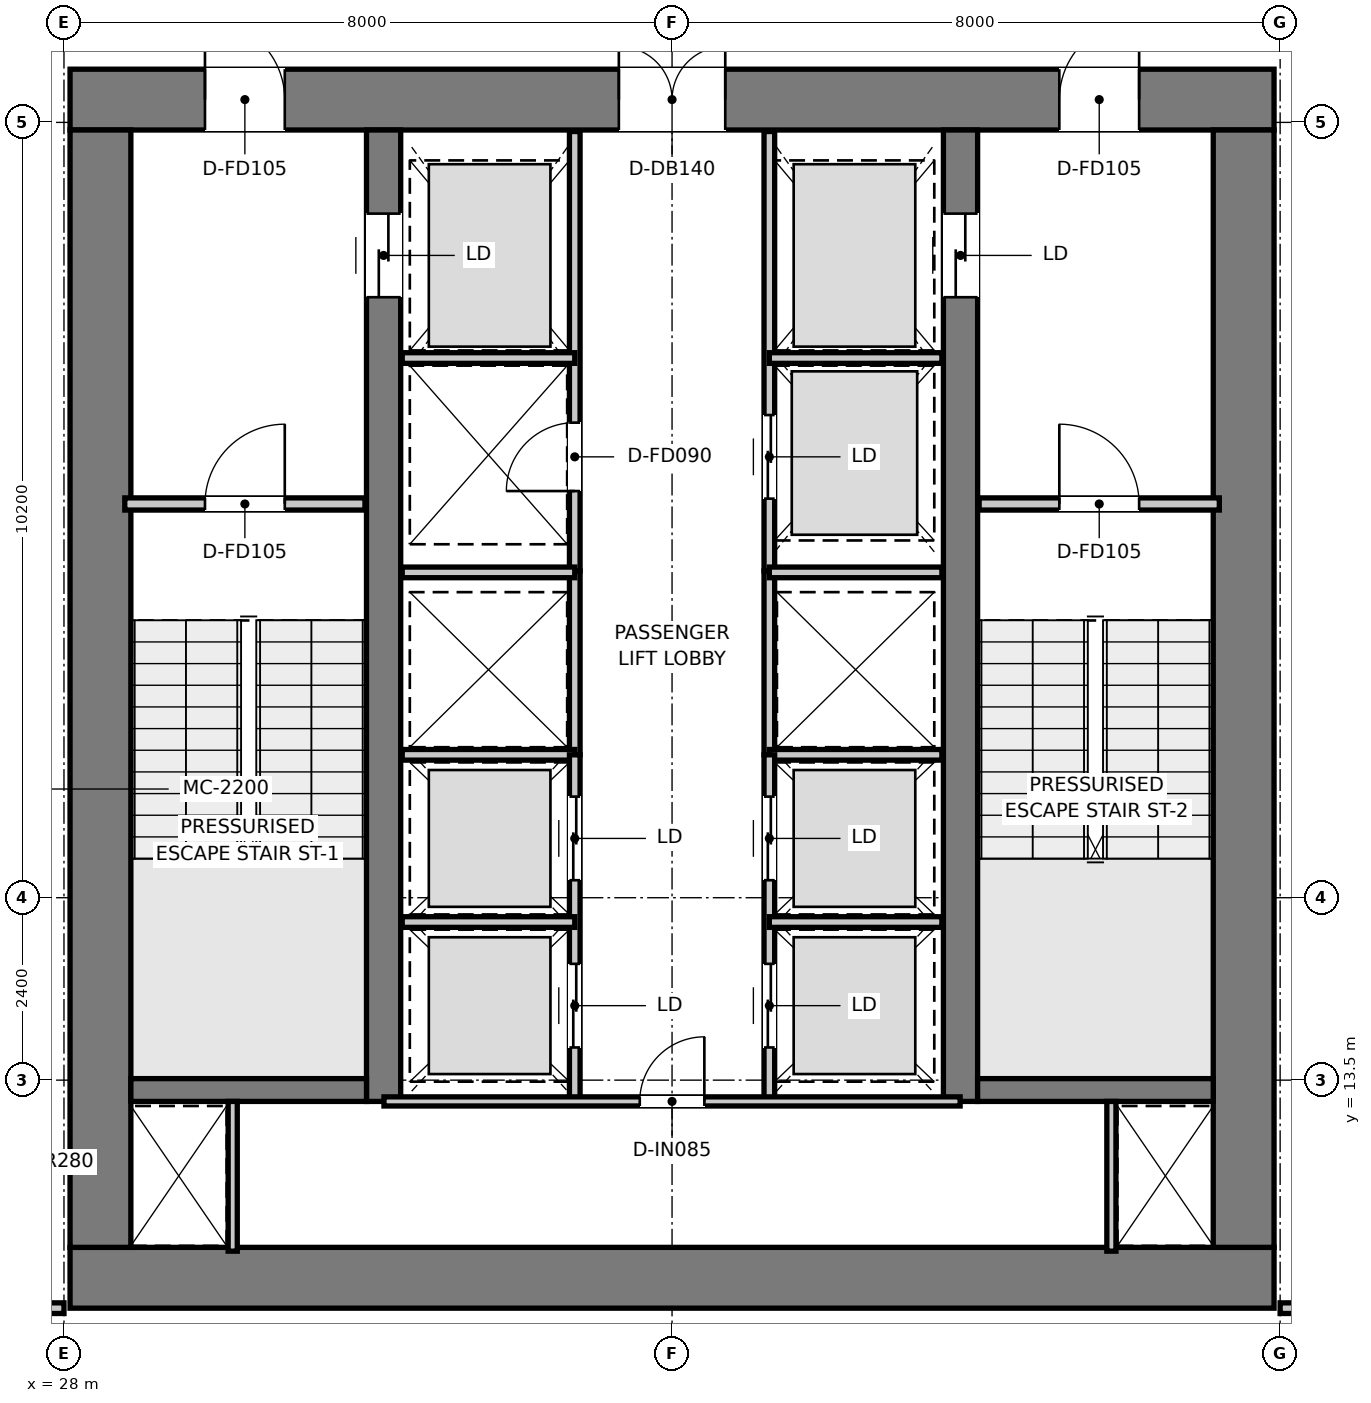
"""IFC4 building model, lengths in metres.
Left out: names, types, materials, properties, quantities, classifications, styles, units other than length and angle.
Written with IfcOpenShell. Run it as: python <this file> out.ifc"""

import sys

from ifc_helpers import new_model, si_unit, direction, frame, frame_2d, origin, place, context, subcontext, project, spatial, rectangle, extrude, element, fill, save


model = new_model("IFC4")
c1 = context("Model", 3, precision=1e-05, world=origin(), true_north=direction((0.0, 1.0)))
c2 = subcontext(c1, "Body", "Model", "MODEL_VIEW")
j1 = project(units=[si_unit("LENGTHUNIT", "METRE"), si_unit("PLANEANGLEUNIT", "RADIAN")], contexts=[c1])
p1 = place(None, origin())
s1 = spatial("IfcSite", under=j1, at=p1, CompositionType="ELEMENT")
p2 = place(p1, origin())
s2 = spatial("IfcBuilding", under=s1, at=p2, CompositionType="ELEMENT")
p3 = place(p2, frame((0.0, 0.0, 48.7)))
s3 = spatial("IfcBuildingStorey", under=s2, at=p3, CompositionType="ELEMENT", Elevation=48.7)
p4 = place(p3, frame((28.08, 10.9, 0.0), z_axis=(0.0, 0.0, 1.0), x_axis=(1.0, 0.0, 0.0)))
e1 = element("IfcWall", 1, at=p4, inside=s3, PredefinedType="SHEAR", context=c2, shape_type="SweptSolid", body=[
    extrude(rectangle(XDim=15.84, YDim=0.8, at=frame_2d((7.92, 0.0))), origin(), (0.0, 0.0, 1.0), 3.95),
])
p5 = place(p3, frame((28.08, 26.4, 0.0), z_axis=(0.0, 0.0, 1.0), x_axis=(1.0, 0.0, 0.0)))
e2 = element("IfcWall", 2, at=p5, inside=s3, PredefinedType="SHEAR", context=c2, shape_type="SweptSolid", body=[
    extrude(rectangle(XDim=15.84, YDim=0.8, at=frame_2d((7.92, 0.0))), origin(), (0.0, 0.0, 1.0), 3.95),
])
p6 = place(p5, frame((7.22, 0.0, 0.0)))
e3 = element("IfcOpeningElement", 3, at=p6, cuts=e2, PredefinedType="OPENING", context=c2, shape_type="SweptSolid", body=[
    extrude(rectangle(XDim=1.4, YDim=2.2, at=frame_2d((0.7, 1.1))), frame((0.0, 0.41, 0.0), z_axis=(0.0, -1.0, 0.0), x_axis=(1.0, 0.0, 0.0)), (0.0, 0.0, 1.0), 0.82),
])
p7 = place(p5, frame((1.775, 0.0, 0.0)))
e4 = element("IfcOpeningElement", 4, at=p7, cuts=e2, PredefinedType="OPENING", context=c2, shape_type="SweptSolid", body=[
    extrude(rectangle(XDim=1.05, YDim=2.1, at=frame_2d((0.525, 1.05))), frame((0.0, 0.41, 0.0), z_axis=(0.0, -1.0, 0.0), x_axis=(1.0, 0.0, 0.0)), (0.0, 0.0, 1.0), 0.82),
])
p8 = place(p5, frame((13.015, 0.0, 0.0)))
e5 = element("IfcOpeningElement", 5, at=p8, cuts=e2, PredefinedType="OPENING", context=c2, shape_type="SweptSolid", body=[
    extrude(rectangle(XDim=1.05, YDim=2.1, at=frame_2d((0.525, 1.05))), frame((0.0, 0.41, 0.0), z_axis=(0.0, -1.0, 0.0), x_axis=(1.0, 0.0, 0.0)), (0.0, 0.0, 1.0), 0.82),
])
for number, where, z_axis, x_axis in (
    (6, (28.48, 11.3, 0.0), (0.0, 0.0, 1.0), (0.0, 1.0, 0.0)),
    (7, (43.52, 11.3, 0.0), (0.0, 0.0, 1.0), (0.0, 1.0, 0.0)),
):
    element("IfcWall", number, at=place(p3, frame(where, z_axis=z_axis, x_axis=x_axis)), inside=s3, PredefinedType="SHEAR", context=c2, shape_type="SweptSolid", body=[
        extrude(rectangle(XDim=14.7, YDim=0.8, at=frame_2d((7.35, 0.0))), origin(), (0.0, 0.0, 1.0), 3.95),
    ])
p9 = place(p3, frame((32.205, 13.22, 0.0), z_axis=(0.0, 0.0, 1.0), x_axis=(0.0, 1.0, 0.0)))
e8 = element("IfcWall", 8, at=p9, inside=s3, PredefinedType="SHEAR", context=c2, shape_type="SweptSolid", body=[
    extrude(rectangle(XDim=12.78, YDim=0.45, at=frame_2d((6.39, 0.0))), origin(), (0.0, 0.0, 1.0), 3.95),
])
p10 = place(p9, frame((10.58, 0.0, 0.0)))
e9 = element("IfcOpeningElement", 9, at=p10, cuts=e8, PredefinedType="OPENING", context=c2, shape_type="SweptSolid", body=[
    extrude(rectangle(XDim=1.1, YDim=2.15, at=frame_2d((0.55, 1.075))), frame((0.0, 0.235, 0.0), z_axis=(0.0, -1.0, 0.0), x_axis=(1.0, 0.0, 0.0)), (0.0, 0.0, 1.0), 0.47),
])
p11 = place(p3, frame((39.795, 13.22, 0.0), z_axis=(0.0, 0.0, 1.0), x_axis=(0.0, 1.0, 0.0)))
e10 = element("IfcWall", 10, at=p11, inside=s3, PredefinedType="SHEAR", context=c2, shape_type="SweptSolid", body=[
    extrude(rectangle(XDim=12.78, YDim=0.45, at=frame_2d((6.39, 0.0))), origin(), (0.0, 0.0, 1.0), 3.95),
])
p12 = place(p11, frame((10.58, 0.0, 0.0)))
e11 = element("IfcOpeningElement", 11, at=p12, cuts=e10, PredefinedType="OPENING", context=c2, shape_type="SweptSolid", body=[
    extrude(rectangle(XDim=1.1, YDim=2.15, at=frame_2d((0.55, 1.075))), frame((0.0, 0.235, 0.0), z_axis=(0.0, -1.0, 0.0), x_axis=(1.0, 0.0, 0.0)), (0.0, 0.0, 1.0), 0.47),
])
for number, where, z_axis, x_axis in (
    (12, (28.88, 13.37, 0.0), (0.0, 0.0, 1.0), (1.0, 0.0, 0.0)),
    (13, (40.02, 13.37, 0.0), (0.0, 0.0, 1.0), (1.0, 0.0, 0.0)),
):
    element("IfcWall", number, at=place(p3, frame(where, z_axis=z_axis, x_axis=x_axis)), inside=s3, PredefinedType="SHEAR", context=c2, shape_type="SweptSolid", body=[
        extrude(rectangle(XDim=3.1, YDim=0.3, at=frame_2d((1.55, 0.0))), origin(), (0.0, 0.0, 1.0), 3.95),
    ])
p13 = place(p3, frame((28.8, 21.08, 0.0), z_axis=(0.0, 0.0, 1.0), x_axis=(1.0, 0.0, 0.0)))
e14 = element("IfcWall", 14, at=p13, inside=s3, PredefinedType="PARTITIONING", context=c2, shape_type="SweptSolid", body=[
    extrude(rectangle(XDim=3.16, YDim=0.16, at=frame_2d((1.58, 0.0))), origin(), (0.0, 0.0, 1.0), 3.67),
])
p14 = place(p13, frame((1.055, 0.0, 0.0)))
e15 = element("IfcOpeningElement", 15, at=p14, cuts=e14, PredefinedType="OPENING", context=c2, shape_type="SweptSolid", body=[
    extrude(rectangle(XDim=1.05, YDim=2.1, at=frame_2d((0.525, 1.05))), frame((0.0, 0.09, 0.0), z_axis=(0.0, -1.0, 0.0), x_axis=(1.0, 0.0, 0.0)), (0.0, 0.0, 1.0), 0.18),
])
p15 = place(p3, frame((40.04, 21.08, 0.0), z_axis=(0.0, 0.0, 1.0), x_axis=(1.0, 0.0, 0.0)))
e16 = element("IfcWall", 16, at=p15, inside=s3, PredefinedType="PARTITIONING", context=c2, shape_type="SweptSolid", body=[
    extrude(rectangle(XDim=3.16, YDim=0.16, at=frame_2d((1.58, 0.0))), origin(), (0.0, 0.0, 1.0), 3.67),
])
p16 = place(p15, frame((1.055, 0.0, 0.0)))
e17 = element("IfcOpeningElement", 17, at=p16, cuts=e16, PredefinedType="OPENING", context=c2, shape_type="SweptSolid", body=[
    extrude(rectangle(XDim=1.05, YDim=2.1, at=frame_2d((0.525, 1.05))), frame((0.0, 0.09, 0.0), z_axis=(0.0, -1.0, 0.0), x_axis=(1.0, 0.0, 0.0)), (0.0, 0.0, 1.0), 0.18),
])
p17 = place(p3, frame((34.72, 20.2, 0.0), z_axis=(0.0, 0.0, 1.0), x_axis=(0.0, 1.0, 0.0)))
e18 = element("IfcWall", 18, at=p17, inside=s3, PredefinedType="PARTITIONING", context=c2, shape_type="SweptSolid", body=[
    extrude(rectangle(XDim=5.78, YDim=0.14, at=frame_2d((2.89, 0.0))), origin(), (0.0, 0.0, 1.0), 2.47),
])
p18 = place(p17, frame((1.05, 0.0, 0.0)))
e19 = element("IfcOpeningElement", 19, at=p18, cuts=e18, PredefinedType="OPENING", context=c2, shape_type="SweptSolid", body=[
    extrude(rectangle(XDim=0.9, YDim=2.1, at=frame_2d((0.45, 1.05))), frame((0.0, 0.08, 0.0), z_axis=(0.0, -1.0, 0.0), x_axis=(1.0, 0.0, 0.0)), (0.0, 0.0, 1.0), 0.16),
])
p19 = place(p3, frame((37.28, 20.2, 0.0), z_axis=(0.0, 0.0, 1.0), x_axis=(0.0, 1.0, 0.0)))
e20 = element("IfcWall", 20, at=p19, inside=s3, PredefinedType="PARTITIONING", context=c2, shape_type="SweptSolid", body=[
    extrude(rectangle(XDim=5.78, YDim=0.14, at=frame_2d((2.89, 0.0))), origin(), (0.0, 0.0, 1.0), 2.47),
])
p20 = place(p19, frame((0.95, 0.0, 0.0)))
e21 = element("IfcOpeningElement", 21, at=p20, cuts=e20, PredefinedType="OPENING", context=c2, shape_type="SweptSolid", body=[
    extrude(rectangle(XDim=1.1, YDim=2.15, at=frame_2d((0.55, 1.075))), frame((0.0, 0.08, 0.0), z_axis=(0.0, -1.0, 0.0), x_axis=(1.0, 0.0, 0.0)), (0.0, 0.0, 1.0), 0.16),
])
for number, where, z_axis, x_axis in (
    (22, (32.45, 23.0, 0.0), (0.0, 0.0, 1.0), (1.0, 0.0, 0.0)),
    (23, (37.28, 23.0, 0.0), (0.0, 0.0, 1.0), (1.0, 0.0, 0.0)),
):
    element("IfcWall", number, at=place(p3, frame(where, z_axis=z_axis, x_axis=x_axis)), inside=s3, PredefinedType="PARTITIONING", context=c2, shape_type="SweptSolid", body=[
        extrude(rectangle(XDim=2.27, YDim=0.14, at=frame_2d((1.135, 0.0))), origin(), (0.0, 0.0, 1.0), 2.47),
    ])
for number, where, z_axis, x_axis in (
    (24, (34.72, 17.78, 0.0), (0.0, 0.0, 1.0), (0.0, 1.0, 0.0)),
    (25, (37.28, 17.78, 0.0), (0.0, 0.0, 1.0), (0.0, 1.0, 0.0)),
):
    element("IfcWall", number, at=place(p3, frame(where, z_axis=z_axis, x_axis=x_axis)), inside=s3, PredefinedType="PARTITIONING", context=c2, shape_type="SweptSolid", body=[
        extrude(rectangle(XDim=2.42, YDim=0.14, at=frame_2d((1.21, 0.0))), origin(), (0.0, 0.0, 1.0), 3.67),
    ])
for number, where, z_axis, x_axis in (
    (26, (32.45, 17.78, 0.0), (0.0, 0.0, 1.0), (1.0, 0.0, 0.0)),
    (27, (32.45, 20.18, 0.0), (0.0, 0.0, 1.0), (1.0, 0.0, 0.0)),
    (28, (37.28, 17.78, 0.0), (0.0, 0.0, 1.0), (1.0, 0.0, 0.0)),
    (29, (37.28, 20.18, 0.0), (0.0, 0.0, 1.0), (1.0, 0.0, 0.0)),
):
    element("IfcWall", number, at=place(p3, frame(where, z_axis=z_axis, x_axis=x_axis)), inside=s3, PredefinedType="PARTITIONING", context=c2, shape_type="SweptSolid", body=[
        extrude(rectangle(XDim=2.27, YDim=0.14, at=frame_2d((1.135, 0.0))), origin(), (0.0, 0.0, 1.0), 3.67),
    ])
p21 = place(p3, frame((34.72, 13.22, 0.0), z_axis=(0.0, 0.0, 1.0), x_axis=(0.0, 1.0, 0.0)))
e30 = element("IfcWall", 30, at=p21, inside=s3, PredefinedType="PARTITIONING", context=c2, shape_type="SweptSolid", body=[
    extrude(rectangle(XDim=4.56, YDim=0.14, at=frame_2d((2.28, 0.0))), origin(), (0.0, 0.0, 1.0), 3.67),
])
p22 = place(p21, frame((0.71, 0.0, 0.0)))
e31 = element("IfcOpeningElement", 31, at=p22, cuts=e30, PredefinedType="OPENING", context=c2, shape_type="SweptSolid", body=[
    extrude(rectangle(XDim=1.1, YDim=2.15, at=frame_2d((0.55, 1.075))), frame((0.0, 0.08, 0.0), z_axis=(0.0, -1.0, 0.0), x_axis=(1.0, 0.0, 0.0)), (0.0, 0.0, 1.0), 0.16),
])
p23 = place(p21, frame((2.91, 0.0, 0.0)))
e32 = element("IfcOpeningElement", 32, at=p23, cuts=e30, PredefinedType="OPENING", context=c2, shape_type="SweptSolid", body=[
    extrude(rectangle(XDim=1.1, YDim=2.15, at=frame_2d((0.55, 1.075))), frame((0.0, 0.08, 0.0), z_axis=(0.0, -1.0, 0.0), x_axis=(1.0, 0.0, 0.0)), (0.0, 0.0, 1.0), 0.16),
])
p24 = place(p3, frame((32.45, 15.58, 0.0), z_axis=(0.0, 0.0, 1.0), x_axis=(1.0, 0.0, 0.0)))
e33 = element("IfcWall", 33, at=p24, inside=s3, PredefinedType="PARTITIONING", context=c2, shape_type="SweptSolid", body=[
    extrude(rectangle(XDim=2.27, YDim=0.14, at=frame_2d((1.135, 0.0))), origin(), (0.0, 0.0, 1.0), 3.67),
])
p25 = place(p3, frame((37.28, 13.22, 0.0), z_axis=(0.0, 0.0, 1.0), x_axis=(0.0, 1.0, 0.0)))
e34 = element("IfcWall", 34, at=p25, inside=s3, PredefinedType="PARTITIONING", context=c2, shape_type="SweptSolid", body=[
    extrude(rectangle(XDim=4.56, YDim=0.14, at=frame_2d((2.28, 0.0))), origin(), (0.0, 0.0, 1.0), 3.67),
])
p26 = place(p25, frame((0.71, 0.0, 0.0)))
e35 = element("IfcOpeningElement", 35, at=p26, cuts=e34, PredefinedType="OPENING", context=c2, shape_type="SweptSolid", body=[
    extrude(rectangle(XDim=1.1, YDim=2.15, at=frame_2d((0.55, 1.075))), frame((0.0, 0.08, 0.0), z_axis=(0.0, -1.0, 0.0), x_axis=(1.0, 0.0, 0.0)), (0.0, 0.0, 1.0), 0.16),
])
p27 = place(p25, frame((2.91, 0.0, 0.0)))
e36 = element("IfcOpeningElement", 36, at=p27, cuts=e34, PredefinedType="OPENING", context=c2, shape_type="SweptSolid", body=[
    extrude(rectangle(XDim=1.1, YDim=2.15, at=frame_2d((0.55, 1.075))), frame((0.0, 0.08, 0.0), z_axis=(0.0, -1.0, 0.0), x_axis=(1.0, 0.0, 0.0)), (0.0, 0.0, 1.0), 0.16),
])
p28 = place(p3, frame((37.28, 15.58, 0.0), z_axis=(0.0, 0.0, 1.0), x_axis=(1.0, 0.0, 0.0)))
e37 = element("IfcWall", 37, at=p28, inside=s3, PredefinedType="PARTITIONING", context=c2, shape_type="SweptSolid", body=[
    extrude(rectangle(XDim=2.27, YDim=0.14, at=frame_2d((1.135, 0.0))), origin(), (0.0, 0.0, 1.0), 3.67),
])
for number, where, z_axis, x_axis in (
    (38, (30.22, 11.25, 0.0), (0.0, 0.0, 1.0), (0.0, 1.0, 0.0)),
    (39, (41.78, 11.25, 0.0), (0.0, 0.0, 1.0), (0.0, 1.0, 0.0)),
):
    element("IfcWall", number, at=place(p3, frame(where, z_axis=z_axis, x_axis=x_axis)), inside=s3, PredefinedType="PARTITIONING", context=c2, shape_type="SweptSolid", body=[
        extrude(rectangle(XDim=1.97, YDim=0.12, at=frame_2d((0.985, 0.0))), origin(), (0.0, 0.0, 1.0), 3.67),
    ])
p29 = place(p3, frame((32.21, 13.22, 0.0), z_axis=(0.0, 0.0, 1.0), x_axis=(1.0, 0.0, 0.0)))
e40 = element("IfcWall", 40, at=p29, inside=s3, PredefinedType="PARTITIONING", context=c2, shape_type="SweptSolid", body=[
    extrude(rectangle(XDim=7.58, YDim=0.12, at=frame_2d((3.79, 0.0))), origin(), (0.0, 0.0, 1.0), 3.67),
])
p30 = place(p29, frame((3.365, 0.0, 0.0)))
e41 = element("IfcOpeningElement", 41, at=p30, cuts=e40, PredefinedType="OPENING", context=c2, shape_type="SweptSolid", body=[
    extrude(rectangle(XDim=0.85, YDim=2.1, at=frame_2d((0.425, 1.05))), frame((0.0, 0.07, 0.0), z_axis=(0.0, -1.0, 0.0), x_axis=(1.0, 0.0, 0.0)), (0.0, 0.0, 1.0), 0.14),
])
p31 = place(p3, frame((26.32, 10.5, 0.0), z_axis=(0.0, 0.0, 1.0), x_axis=(1.0, 0.0, 0.0)))
e42 = element("IfcWall", 42, at=p31, inside=s3, PredefinedType="PARTITIONING", context=c2, shape_type="SweptSolid", body=[
    extrude(rectangle(XDim=1.68, YDim=0.14, at=frame_2d((0.84, 0.0))), origin(), (0.0, 0.0, 1.0), 3.67),
])
p32 = place(p31, frame((0.445, 0.0, 0.0)))
e43 = element("IfcOpeningElement", 43, at=p32, cuts=e42, PredefinedType="OPENING", context=c2, shape_type="SweptSolid", body=[
    extrude(rectangle(XDim=0.85, YDim=2.1, at=frame_2d((0.425, 1.05))), frame((0.0, 0.08, 0.0), z_axis=(0.0, -1.0, 0.0), x_axis=(1.0, 0.0, 0.0)), (0.0, 0.0, 1.0), 0.16),
])
p33 = place(p3, frame((44.0, 10.5, 0.0), z_axis=(0.0, 0.0, 1.0), x_axis=(1.0, 0.0, 0.0)))
e44 = element("IfcWall", 44, at=p33, inside=s3, PredefinedType="PARTITIONING", context=c2, shape_type="SweptSolid", body=[
    extrude(rectangle(XDim=1.68, YDim=0.14, at=frame_2d((0.84, 0.0))), origin(), (0.0, 0.0, 1.0), 3.67),
])
p34 = place(p14, origin())
e45 = element("IfcDoor", 45, at=p34, inside=s3, OperationType="SINGLE_SWING_RIGHT", PredefinedType="DOOR", context=c2, shape_type="SweptSolid", body=[
    extrude(rectangle(XDim=1.05, YDim=2.1, at=frame_2d((0.525, 1.05))), frame((0.0, 0.025, 0.0), z_axis=(0.0, -1.0, 0.0), x_axis=(1.0, 0.0, 0.0)), (0.0, 0.0, 1.0), 0.05),
])
fill(e15, e45)
p35 = place(p16, origin())
e46 = element("IfcDoor", 46, at=p35, inside=s3, OperationType="SINGLE_SWING_LEFT", PredefinedType="DOOR", context=c2, shape_type="SweptSolid", body=[
    extrude(rectangle(XDim=1.05, YDim=2.1, at=frame_2d((0.525, 1.05))), frame((0.0, 0.025, 0.0), z_axis=(0.0, -1.0, 0.0), x_axis=(1.0, 0.0, 0.0)), (0.0, 0.0, 1.0), 0.05),
])
fill(e17, e46)
p36 = place(p6, origin())
e47 = element("IfcDoor", 47, at=p36, inside=s3, OperationType="DOUBLE_DOOR_SINGLE_SWING", PredefinedType="DOOR", context=c2, shape_type="SweptSolid", body=[
    extrude(rectangle(XDim=1.4, YDim=2.2, at=frame_2d((0.7, 1.1))), frame((0.0, 0.025, 0.0), z_axis=(0.0, -1.0, 0.0), x_axis=(1.0, 0.0, 0.0)), (0.0, 0.0, 1.0), 0.05),
])
fill(e3, e47)
p37 = place(p7, origin())
e48 = element("IfcDoor", 48, at=p37, inside=s3, OperationType="SINGLE_SWING_LEFT", PredefinedType="DOOR", context=c2, shape_type="SweptSolid", body=[
    extrude(rectangle(XDim=1.05, YDim=2.1, at=frame_2d((0.525, 1.05))), frame((0.0, 0.025, 0.0), z_axis=(0.0, -1.0, 0.0), x_axis=(1.0, 0.0, 0.0)), (0.0, 0.0, 1.0), 0.05),
])
fill(e4, e48)
p38 = place(p8, origin())
e49 = element("IfcDoor", 49, at=p38, inside=s3, OperationType="SINGLE_SWING_RIGHT", PredefinedType="DOOR", context=c2, shape_type="SweptSolid", body=[
    extrude(rectangle(XDim=1.05, YDim=2.1, at=frame_2d((0.525, 1.05))), frame((0.0, 0.025, 0.0), z_axis=(0.0, -1.0, 0.0), x_axis=(1.0, 0.0, 0.0)), (0.0, 0.0, 1.0), 0.05),
])
fill(e5, e49)
p39 = place(p10, origin())
e50 = element("IfcDoor", 50, at=p39, inside=s3, OperationType="DOUBLE_DOOR_SLIDING", PredefinedType="DOOR", context=c2, shape_type="SweptSolid", body=[
    extrude(rectangle(XDim=1.1, YDim=2.15, at=frame_2d((0.55, 1.075))), frame((0.0, 0.025, 0.0), z_axis=(0.0, -1.0, 0.0), x_axis=(1.0, 0.0, 0.0)), (0.0, 0.0, 1.0), 0.05),
])
fill(e9, e50)
p40 = place(p12, origin())
e51 = element("IfcDoor", 51, at=p40, inside=s3, OperationType="DOUBLE_DOOR_SLIDING", PredefinedType="DOOR", context=c2, shape_type="SweptSolid", body=[
    extrude(rectangle(XDim=1.1, YDim=2.15, at=frame_2d((0.55, 1.075))), frame((0.0, 0.025, 0.0), z_axis=(0.0, -1.0, 0.0), x_axis=(1.0, 0.0, 0.0)), (0.0, 0.0, 1.0), 0.05),
])
fill(e11, e51)
p41 = place(p18, origin())
e52 = element("IfcDoor", 52, at=p41, inside=s3, OperationType="SINGLE_SWING_LEFT", PredefinedType="DOOR", context=c2, shape_type="SweptSolid", body=[
    extrude(rectangle(XDim=0.9, YDim=2.1, at=frame_2d((0.45, 1.05))), frame((0.0, 0.025, 0.0), z_axis=(0.0, -1.0, 0.0), x_axis=(1.0, 0.0, 0.0)), (0.0, 0.0, 1.0), 0.05),
])
fill(e19, e52)
p42 = place(p20, origin())
e53 = element("IfcDoor", 53, at=p42, inside=s3, OperationType="DOUBLE_DOOR_SLIDING", PredefinedType="DOOR", context=c2, shape_type="SweptSolid", body=[
    extrude(rectangle(XDim=1.1, YDim=2.15, at=frame_2d((0.55, 1.075))), frame((0.0, 0.025, 0.0), z_axis=(0.0, -1.0, 0.0), x_axis=(1.0, 0.0, 0.0)), (0.0, 0.0, 1.0), 0.05),
])
fill(e21, e53)
p43 = place(p22, origin())
e54 = element("IfcDoor", 54, at=p43, inside=s3, OperationType="DOUBLE_DOOR_SLIDING", PredefinedType="DOOR", context=c2, shape_type="SweptSolid", body=[
    extrude(rectangle(XDim=1.1, YDim=2.15, at=frame_2d((0.55, 1.075))), frame((0.0, 0.025, 0.0), z_axis=(0.0, -1.0, 0.0), x_axis=(1.0, 0.0, 0.0)), (0.0, 0.0, 1.0), 0.05),
])
fill(e31, e54)
p44 = place(p23, origin())
e55 = element("IfcDoor", 55, at=p44, inside=s3, OperationType="DOUBLE_DOOR_SLIDING", PredefinedType="DOOR", context=c2, shape_type="SweptSolid", body=[
    extrude(rectangle(XDim=1.1, YDim=2.15, at=frame_2d((0.55, 1.075))), frame((0.0, 0.025, 0.0), z_axis=(0.0, -1.0, 0.0), x_axis=(1.0, 0.0, 0.0)), (0.0, 0.0, 1.0), 0.05),
])
fill(e32, e55)
p45 = place(p26, origin())
e56 = element("IfcDoor", 56, at=p45, inside=s3, OperationType="DOUBLE_DOOR_SLIDING", PredefinedType="DOOR", context=c2, shape_type="SweptSolid", body=[
    extrude(rectangle(XDim=1.1, YDim=2.15, at=frame_2d((0.55, 1.075))), frame((0.0, 0.025, 0.0), z_axis=(0.0, -1.0, 0.0), x_axis=(1.0, 0.0, 0.0)), (0.0, 0.0, 1.0), 0.05),
])
fill(e35, e56)
p46 = place(p27, origin())
e57 = element("IfcDoor", 57, at=p46, inside=s3, OperationType="DOUBLE_DOOR_SLIDING", PredefinedType="DOOR", context=c2, shape_type="SweptSolid", body=[
    extrude(rectangle(XDim=1.1, YDim=2.15, at=frame_2d((0.55, 1.075))), frame((0.0, 0.025, 0.0), z_axis=(0.0, -1.0, 0.0), x_axis=(1.0, 0.0, 0.0)), (0.0, 0.0, 1.0), 0.05),
])
fill(e36, e57)
p47 = place(p30, origin())
e58 = element("IfcDoor", 58, at=p47, inside=s3, OperationType="SINGLE_SWING_RIGHT", PredefinedType="DOOR", context=c2, shape_type="SweptSolid", body=[
    extrude(rectangle(XDim=0.85, YDim=2.1, at=frame_2d((0.425, 1.05))), frame((0.0, 0.025, 0.0), z_axis=(0.0, -1.0, 0.0), x_axis=(1.0, 0.0, 0.0)), (0.0, 0.0, 1.0), 0.05),
])
fill(e41, e58)
save(model, sys.argv[1])
